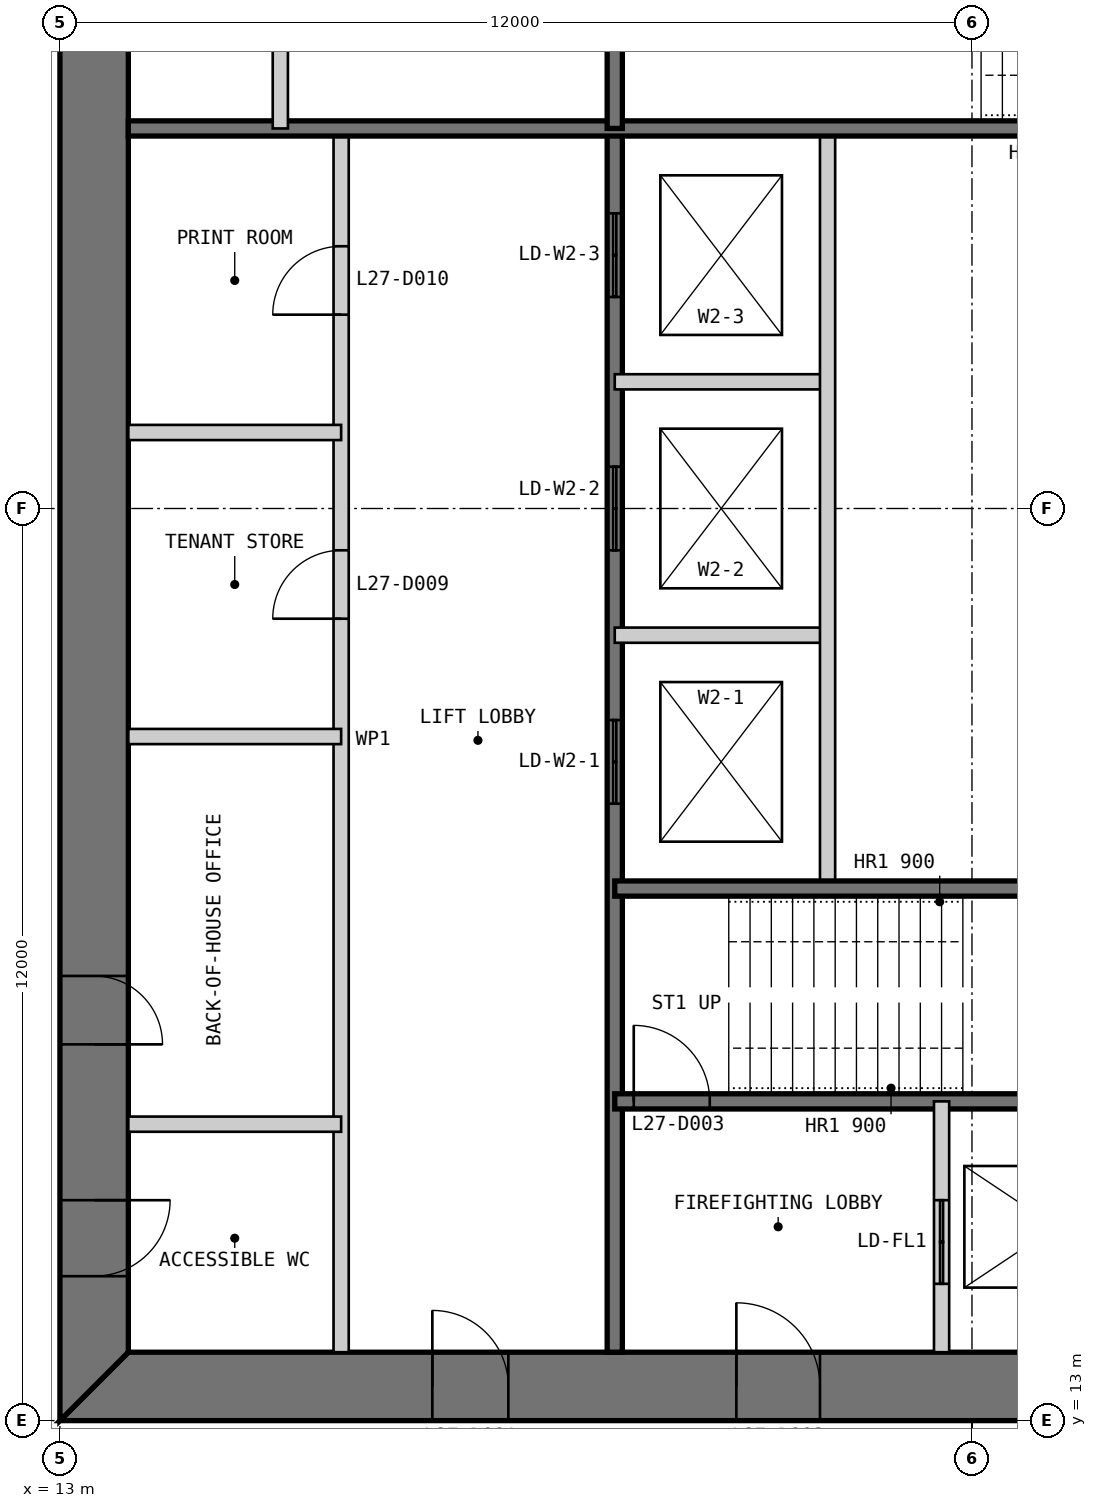
"""IFC4 building model, lengths in metres.
Left out: names, types, materials, properties, quantities, classifications, styles, units other than length and angle.
Written with IfcOpenShell. Run it as: python <this file> out.ifc"""

import sys

from ifc_helpers import new_model, si_unit, direction, frame, frame_2d, origin, place, context, subcontext, project, spatial, polyline, rectangle, outline, extrude, element, fill, save


model = new_model("IFC4")
c1 = context("Model", 3, precision=1e-05, world=origin(), true_north=direction((0.0, 1.0)))
c2 = subcontext(c1, "Body", "Model", "MODEL_VIEW")
j1 = project(units=[si_unit("LENGTHUNIT", "METRE"), si_unit("PLANEANGLEUNIT", "RADIAN")], contexts=[c1])
p1 = place(None, origin())
s1 = spatial("IfcSite", under=j1, at=p1, CompositionType="ELEMENT")
p2 = place(p1, origin())
s2 = spatial("IfcBuilding", under=s1, at=p2, CompositionType="ELEMENT")
p3 = place(p2, frame((0.0, 0.0, 118.4)))
s3 = spatial("IfcBuildingStorey", under=s2, at=p3, CompositionType="ELEMENT", Elevation=118.4)
p4 = place(p3, frame((13.0, 13.45, 0.0), z_axis=(0.0, 0.0, 1.0), x_axis=(1.0, 0.0, 0.0)))
e1 = element("IfcWall", 1, at=p4, inside=s3, PredefinedType="SHEAR", context=c2, shape_type="SweptSolid", body=[
    extrude(outline(polyline([(0.0, -0.45), (24.0, -0.45), (23.1, 0.45), (0.9, 0.45), (0.0, -0.45)])), origin(), (0.0, 0.0, 1.0), 4.0),
])
p5 = place(p4, frame((4.9, 0.0, 0.0)))
e2 = element("IfcOpeningElement", 2, at=p5, cuts=e1, PredefinedType="OPENING", context=c2, shape_type="SweptSolid", body=[
    extrude(rectangle(XDim=1.0, YDim=2.2, at=frame_2d((0.5, 1.1))), frame((0.0, 0.46, 0.0), z_axis=(0.0, -1.0, 0.0), x_axis=(1.0, 0.0, 0.0)), (0.0, 0.0, 1.0), 0.92),
])
p6 = place(p4, frame((8.9, 0.0, 0.0)))
e3 = element("IfcOpeningElement", 3, at=p6, cuts=e1, PredefinedType="OPENING", context=c2, shape_type="SweptSolid", body=[
    extrude(rectangle(XDim=1.1, YDim=2.2, at=frame_2d((0.55, 1.1))), frame((0.0, 0.46, 0.0), z_axis=(0.0, -1.0, 0.0), x_axis=(1.0, 0.0, 0.0)), (0.0, 0.0, 1.0), 0.92),
])
p7 = place(p4, frame((15.05, 0.0, 0.0)))
e4 = element("IfcOpeningElement", 4, at=p7, cuts=e1, PredefinedType="OPENING", context=c2, shape_type="SweptSolid", body=[
    extrude(rectangle(XDim=0.9, YDim=2.2, at=frame_2d((0.45, 1.1))), frame((0.0, 0.46, 0.0), z_axis=(0.0, -1.0, 0.0), x_axis=(1.0, 0.0, 0.0)), (0.0, 0.0, 1.0), 0.92),
])
p8 = place(p4, frame((17.9, 0.0, 0.0)))
e5 = element("IfcOpeningElement", 5, at=p8, cuts=e1, PredefinedType="OPENING", context=c2, shape_type="SweptSolid", body=[
    extrude(rectangle(XDim=1.0, YDim=2.2, at=frame_2d((0.5, 1.1))), frame((0.0, 0.46, 0.0), z_axis=(0.0, -1.0, 0.0), x_axis=(1.0, 0.0, 0.0)), (0.0, 0.0, 1.0), 0.92),
])
p9 = place(p4, frame((21.4, 0.0, 0.0)))
e6 = element("IfcOpeningElement", 6, at=p9, cuts=e1, PredefinedType="OPENING", context=c2, shape_type="SweptSolid", body=[
    extrude(rectangle(XDim=1.0, YDim=2.2, at=frame_2d((0.5, 1.1))), frame((0.0, 0.46, 0.0), z_axis=(0.0, -1.0, 0.0), x_axis=(1.0, 0.0, 0.0)), (0.0, 0.0, 1.0), 0.92),
])
p10 = place(p3, frame((13.45, 36.1, 0.0), z_axis=(0.0, 0.0, 1.0), x_axis=(0.0, -1.0, 0.0)))
e7 = element("IfcWall", 7, at=p10, inside=s3, PredefinedType="SHEAR", context=c2, shape_type="SweptSolid", body=[
    extrude(outline(polyline([(-0.9, -0.45), (23.1, -0.45), (22.2, 0.45), (0.0, 0.45), (-0.9, -0.45)])), origin(), (0.0, 0.0, 1.0), 4.0),
])
p11 = place(p10, frame((20.2, 0.0, 0.0)))
e8 = element("IfcOpeningElement", 8, at=p11, cuts=e7, PredefinedType="OPENING", context=c2, shape_type="SweptSolid", body=[
    extrude(rectangle(XDim=1.0, YDim=2.2, at=frame_2d((0.5, 1.1))), frame((0.0, 0.46, 0.0), z_axis=(0.0, -1.0, 0.0), x_axis=(1.0, 0.0, 0.0)), (0.0, 0.0, 1.0), 0.92),
])
p12 = place(p10, frame((17.25, 0.0, 0.0)))
e9 = element("IfcOpeningElement", 9, at=p12, cuts=e7, PredefinedType="OPENING", context=c2, shape_type="SweptSolid", body=[
    extrude(rectangle(XDim=0.9, YDim=2.2, at=frame_2d((0.45, 1.1))), frame((0.0, 0.46, 0.0), z_axis=(0.0, -1.0, 0.0), x_axis=(1.0, 0.0, 0.0)), (0.0, 0.0, 1.0), 0.92),
])
p13 = place(p3, frame((16.7, 13.9, 0.0), z_axis=(0.0, 0.0, 1.0), x_axis=(0.0, 1.0, 0.0)))
e10 = element("IfcWall", 10, at=p13, inside=s3, PredefinedType="PARTITIONING", context=c2, shape_type="SweptSolid", body=[
    extrude(rectangle(XDim=16.1, YDim=0.2, at=frame_2d((8.05, 0.0))), origin(), (0.0, 0.0, 1.0), 3.8),
])
p14 = place(p13, frame((9.65, 0.0, 0.0)))
e11 = element("IfcOpeningElement", 11, at=p14, cuts=e10, PredefinedType="OPENING", context=c2, shape_type="SweptSolid", body=[
    extrude(rectangle(XDim=0.9, YDim=2.2, at=frame_2d((0.45, 1.1))), frame((0.0, 0.11, 0.0), z_axis=(0.0, -1.0, 0.0), x_axis=(1.0, 0.0, 0.0)), (0.0, 0.0, 1.0), 0.22),
])
p15 = place(p13, frame((13.65, 0.0, 0.0)))
e12 = element("IfcOpeningElement", 12, at=p15, cuts=e10, PredefinedType="OPENING", context=c2, shape_type="SweptSolid", body=[
    extrude(rectangle(XDim=0.9, YDim=2.2, at=frame_2d((0.45, 1.1))), frame((0.0, 0.11, 0.0), z_axis=(0.0, -1.0, 0.0), x_axis=(1.0, 0.0, 0.0)), (0.0, 0.0, 1.0), 0.22),
])
p16 = place(p3, frame((20.3, 13.9, 0.0), z_axis=(0.0, 0.0, 1.0), x_axis=(0.0, 1.0, 0.0)))
e13 = element("IfcWall", 13, at=p16, inside=s3, PredefinedType="SOLIDWALL", context=c2, shape_type="SweptSolid", body=[
    extrude(rectangle(XDim=16.1, YDim=0.2, at=frame_2d((8.05, 0.0))), origin(), (0.0, 0.0, 1.0), 3.8),
])
p17 = place(p16, frame((7.217, 0.0, 0.0)))
e14 = element("IfcOpeningElement", 14, at=p17, cuts=e13, PredefinedType="OPENING", context=c2, shape_type="SweptSolid", body=[
    extrude(rectangle(XDim=1.1, YDim=2.2, at=frame_2d((0.55, 1.1))), frame((0.0, 0.11, 0.0), z_axis=(0.0, -1.0, 0.0), x_axis=(1.0, 0.0, 0.0)), (0.0, 0.0, 1.0), 0.22),
])
p18 = place(p16, frame((10.55, 0.0, 0.0)))
e15 = element("IfcOpeningElement", 15, at=p18, cuts=e13, PredefinedType="OPENING", context=c2, shape_type="SweptSolid", body=[
    extrude(rectangle(XDim=1.1, YDim=2.2, at=frame_2d((0.55, 1.1))), frame((0.0, 0.11, 0.0), z_axis=(0.0, -1.0, 0.0), x_axis=(1.0, 0.0, 0.0)), (0.0, 0.0, 1.0), 0.22),
])
p19 = place(p16, frame((13.883, 0.0, 0.0)))
e16 = element("IfcOpeningElement", 16, at=p19, cuts=e13, PredefinedType="OPENING", context=c2, shape_type="SweptSolid", body=[
    extrude(rectangle(XDim=1.1, YDim=2.2, at=frame_2d((0.55, 1.1))), frame((0.0, 0.11, 0.0), z_axis=(0.0, -1.0, 0.0), x_axis=(1.0, 0.0, 0.0)), (0.0, 0.0, 1.0), 0.22),
])
for number, where, z_axis, x_axis in (
    (17, (20.3, 23.333, 0.0), (0.0, 0.0, 1.0), (1.0, 0.0, 0.0)),
    (18, (20.3, 26.667, 0.0), (0.0, 0.0, 1.0), (1.0, 0.0, 0.0)),
):
    element("IfcWall", number, at=place(p3, frame(where, z_axis=z_axis, x_axis=x_axis)), inside=s3, PredefinedType="PARTITIONING", context=c2, shape_type="SweptSolid", body=[
        extrude(rectangle(XDim=2.8, YDim=0.2, at=frame_2d((1.4, 0.0))), origin(), (0.0, 0.0, 1.0), 3.8),
    ])
p20 = place(p3, frame((23.1, 20.0, 0.0), z_axis=(0.0, 0.0, 1.0), x_axis=(0.0, 1.0, 0.0)))
e19 = element("IfcWall", 19, at=p20, inside=s3, PredefinedType="PARTITIONING", context=c2, shape_type="SweptSolid", body=[
    extrude(rectangle(XDim=10.0, YDim=0.2, at=frame_2d((5.0, 0.0))), origin(), (0.0, 0.0, 1.0), 3.8),
])
p21 = place(p3, frame((20.3, 17.2, 0.0), z_axis=(0.0, 0.0, 1.0), x_axis=(1.0, 0.0, 0.0)))
e20 = element("IfcWall", 20, at=p21, inside=s3, PredefinedType="SOLIDWALL", context=c2, shape_type="SweptSolid", body=[
    extrude(rectangle(XDim=9.4, YDim=0.2, at=frame_2d((4.7, 0.0))), origin(), (0.0, 0.0, 1.0), 3.8),
])
p22 = place(p21, frame((0.25, 0.0, 0.0)))
e21 = element("IfcOpeningElement", 21, at=p22, cuts=e20, PredefinedType="OPENING", context=c2, shape_type="SweptSolid", body=[
    extrude(rectangle(XDim=1.0, YDim=2.2, at=frame_2d((0.5, 1.1))), frame((0.0, 0.11, 0.0), z_axis=(0.0, -1.0, 0.0), x_axis=(1.0, 0.0, 0.0)), (0.0, 0.0, 1.0), 0.22),
])
p23 = place(p3, frame((20.3, 20.0, 0.0), z_axis=(0.0, 0.0, 1.0), x_axis=(1.0, 0.0, 0.0)))
e22 = element("IfcWall", 22, at=p23, inside=s3, PredefinedType="SOLIDWALL", context=c2, shape_type="SweptSolid", body=[
    extrude(rectangle(XDim=15.8, YDim=0.2, at=frame_2d((7.9, 0.0))), origin(), (0.0, 0.0, 1.0), 3.8),
])
p24 = place(p3, frame((24.6, 13.9, 0.0), z_axis=(0.0, 0.0, 1.0), x_axis=(0.0, 1.0, 0.0)))
e23 = element("IfcWall", 23, at=p24, inside=s3, PredefinedType="PARTITIONING", context=c2, shape_type="SweptSolid", body=[
    extrude(rectangle(XDim=3.3, YDim=0.2, at=frame_2d((1.65, 0.0))), origin(), (0.0, 0.0, 1.0), 3.8),
])
p25 = place(p24, frame((0.9, 0.0, 0.0)))
e24 = element("IfcOpeningElement", 24, at=p25, cuts=e23, PredefinedType="OPENING", context=c2, shape_type="SweptSolid", body=[
    extrude(rectangle(XDim=1.1, YDim=2.2, at=frame_2d((0.55, 1.1))), frame((0.0, 0.11, 0.0), z_axis=(0.0, -1.0, 0.0), x_axis=(1.0, 0.0, 0.0)), (0.0, 0.0, 1.0), 0.22),
])
for number, where, z_axis, x_axis in (
    (25, (13.9, 16.9, 0.0), (0.0, 0.0, 1.0), (1.0, 0.0, 0.0)),
    (26, (13.9, 22.0, 0.0), (0.0, 0.0, 1.0), (1.0, 0.0, 0.0)),
    (27, (13.9, 26.0, 0.0), (0.0, 0.0, 1.0), (1.0, 0.0, 0.0)),
):
    element("IfcWall", number, at=place(p3, frame(where, z_axis=z_axis, x_axis=x_axis)), inside=s3, PredefinedType="PARTITIONING", context=c2, shape_type="SweptSolid", body=[
        extrude(rectangle(XDim=2.8, YDim=0.2, at=frame_2d((1.4, 0.0))), origin(), (0.0, 0.0, 1.0), 3.8),
    ])
p26 = place(p3, frame((29.7, 30.0, 0.0), z_axis=(0.0, 0.0, 1.0), x_axis=(-1.0, 0.0, 0.0)))
e28 = element("IfcWall", 28, at=p26, inside=s3, PredefinedType="SOLIDWALL", context=c2, shape_type="SweptSolid", body=[
    extrude(rectangle(XDim=15.8, YDim=0.2, at=frame_2d((7.9, 0.0))), origin(), (0.0, 0.0, 1.0), 3.8),
])
p27 = place(p3, frame((20.3, 36.1, 0.0), z_axis=(0.0, 0.0, 1.0), x_axis=(0.0, -1.0, 0.0)))
e29 = element("IfcWall", 29, at=p27, inside=s3, PredefinedType="SOLIDWALL", context=c2, shape_type="SweptSolid", body=[
    extrude(rectangle(XDim=6.1, YDim=0.2, at=frame_2d((3.05, 0.0))), origin(), (0.0, 0.0, 1.0), 3.8),
])
p28 = place(p3, frame((15.9, 36.1, 0.0), z_axis=(0.0, 0.0, 1.0), x_axis=(0.0, -1.0, 0.0)))
e30 = element("IfcWall", 30, at=p28, inside=s3, PredefinedType="PARTITIONING", context=c2, shape_type="SweptSolid", body=[
    extrude(rectangle(XDim=6.1, YDim=0.2, at=frame_2d((3.05, 0.0))), origin(), (0.0, 0.0, 1.0), 3.8),
])
p29 = place(p5, origin())
e31 = element("IfcDoor", 31, at=p29, inside=s3, OperationType="SINGLE_SWING_LEFT", PredefinedType="DOOR", context=c2, shape_type="SweptSolid", body=[
    extrude(rectangle(XDim=1.0, YDim=2.2, at=frame_2d((0.5, 1.1))), frame((0.0, 0.025, 0.0), z_axis=(0.0, -1.0, 0.0), x_axis=(1.0, 0.0, 0.0)), (0.0, 0.0, 1.0), 0.05),
    extrude(outline(polyline([(0.0, 0.0), (0.04, 0.0), (0.04, 2.16), (0.96, 2.16), (0.96, 0.0), (1.0, 0.0), (1.0, 2.2), (0.0, 2.2), (0.0, 0.0)])), frame((0.0, 0.3, 0.0), z_axis=(0.0, -1.0, 0.0), x_axis=(1.0, 0.0, 0.0)), (0.0, 0.0, 1.0), 0.6),
])
fill(e2, e31)
p30 = place(p6, origin())
e32 = element("IfcDoor", 32, at=p30, inside=s3, OperationType="SINGLE_SWING_LEFT", PredefinedType="DOOR", context=c2, shape_type="SweptSolid", body=[
    extrude(rectangle(XDim=1.1, YDim=2.2, at=frame_2d((0.55, 1.1))), frame((0.0, 0.025, 0.0), z_axis=(0.0, -1.0, 0.0), x_axis=(1.0, 0.0, 0.0)), (0.0, 0.0, 1.0), 0.05),
    extrude(outline(polyline([(0.0, 0.0), (0.04, 0.0), (0.04, 2.16), (1.06, 2.16), (1.06, 0.0), (1.1, 0.0), (1.1, 2.2), (0.0, 2.2), (0.0, 0.0)])), frame((0.0, 0.3, 0.0), z_axis=(0.0, -1.0, 0.0), x_axis=(1.0, 0.0, 0.0)), (0.0, 0.0, 1.0), 0.6),
])
fill(e3, e32)
p31 = place(p22, origin())
e33 = element("IfcDoor", 33, at=p31, inside=s3, OperationType="SINGLE_SWING_LEFT", PredefinedType="DOOR", context=c2, shape_type="SweptSolid", body=[
    extrude(rectangle(XDim=1.0, YDim=2.2, at=frame_2d((0.5, 1.1))), frame((0.0, 0.025, 0.0), z_axis=(0.0, -1.0, 0.0), x_axis=(1.0, 0.0, 0.0)), (0.0, 0.0, 1.0), 0.05),
])
fill(e21, e33)
p32 = place(p11, origin())
e34 = element("IfcDoor", 34, at=p32, inside=s3, OperationType="SINGLE_SWING_LEFT", PredefinedType="DOOR", context=c2, shape_type="SweptSolid", body=[
    extrude(rectangle(XDim=1.0, YDim=2.2, at=frame_2d((0.5, 1.1))), frame((0.0, 0.025, 0.0), z_axis=(0.0, -1.0, 0.0), x_axis=(1.0, 0.0, 0.0)), (0.0, 0.0, 1.0), 0.05),
    extrude(outline(polyline([(0.0, 0.0), (0.04, 0.0), (0.04, 2.16), (0.96, 2.16), (0.96, 0.0), (1.0, 0.0), (1.0, 2.2), (0.0, 2.2), (0.0, 0.0)])), frame((0.0, 0.3, 0.0), z_axis=(0.0, -1.0, 0.0), x_axis=(1.0, 0.0, 0.0)), (0.0, 0.0, 1.0), 0.6),
])
fill(e8, e34)
p33 = place(p12, origin())
e35 = element("IfcDoor", 35, at=p33, inside=s3, OperationType="SINGLE_SWING_RIGHT", PredefinedType="DOOR", context=c2, shape_type="SweptSolid", body=[
    extrude(rectangle(XDim=0.9, YDim=2.2, at=frame_2d((0.45, 1.1))), frame((0.0, 0.025, 0.0), z_axis=(0.0, -1.0, 0.0), x_axis=(1.0, 0.0, 0.0)), (0.0, 0.0, 1.0), 0.05),
    extrude(outline(polyline([(0.0, 0.0), (0.04, 0.0), (0.04, 2.16), (0.86, 2.16), (0.86, 0.0), (0.9, 0.0), (0.9, 2.2), (0.0, 2.2), (0.0, 0.0)])), frame((0.0, 0.3, 0.0), z_axis=(0.0, -1.0, 0.0), x_axis=(1.0, 0.0, 0.0)), (0.0, 0.0, 1.0), 0.6),
])
fill(e9, e35)
p34 = place(p14, origin())
e36 = element("IfcDoor", 36, at=p34, inside=s3, OperationType="SINGLE_SWING_LEFT", PredefinedType="DOOR", context=c2, shape_type="SweptSolid", body=[
    extrude(rectangle(XDim=0.9, YDim=2.2, at=frame_2d((0.45, 1.1))), frame((0.0, 0.025, 0.0), z_axis=(0.0, -1.0, 0.0), x_axis=(1.0, 0.0, 0.0)), (0.0, 0.0, 1.0), 0.05),
])
fill(e11, e36)
p35 = place(p15, origin())
e37 = element("IfcDoor", 37, at=p35, inside=s3, OperationType="SINGLE_SWING_LEFT", PredefinedType="DOOR", context=c2, shape_type="SweptSolid", body=[
    extrude(rectangle(XDim=0.9, YDim=2.2, at=frame_2d((0.45, 1.1))), frame((0.0, 0.025, 0.0), z_axis=(0.0, -1.0, 0.0), x_axis=(1.0, 0.0, 0.0)), (0.0, 0.0, 1.0), 0.05),
])
fill(e12, e37)
p36 = place(p25, origin())
e38 = element("IfcDoor", 38, at=p36, inside=s3, OperationType="DOUBLE_DOOR_SLIDING", PredefinedType="DOOR", context=c2, shape_type="SweptSolid", body=[
    extrude(rectangle(XDim=1.1, YDim=2.2, at=frame_2d((0.55, 1.1))), frame((0.0, 0.025, 0.0), z_axis=(0.0, -1.0, 0.0), x_axis=(1.0, 0.0, 0.0)), (0.0, 0.0, 1.0), 0.05),
])
fill(e24, e38)
p37 = place(p17, origin())
e39 = element("IfcDoor", 39, at=p37, inside=s3, OperationType="DOUBLE_DOOR_SLIDING", PredefinedType="DOOR", context=c2, shape_type="SweptSolid", body=[
    extrude(rectangle(XDim=1.1, YDim=2.2, at=frame_2d((0.55, 1.1))), frame((0.0, 0.025, 0.0), z_axis=(0.0, -1.0, 0.0), x_axis=(1.0, 0.0, 0.0)), (0.0, 0.0, 1.0), 0.05),
])
fill(e14, e39)
p38 = place(p18, origin())
e40 = element("IfcDoor", 40, at=p38, inside=s3, OperationType="DOUBLE_DOOR_SLIDING", PredefinedType="DOOR", context=c2, shape_type="SweptSolid", body=[
    extrude(rectangle(XDim=1.1, YDim=2.2, at=frame_2d((0.55, 1.1))), frame((0.0, 0.025, 0.0), z_axis=(0.0, -1.0, 0.0), x_axis=(1.0, 0.0, 0.0)), (0.0, 0.0, 1.0), 0.05),
])
fill(e15, e40)
p39 = place(p19, origin())
e41 = element("IfcDoor", 41, at=p39, inside=s3, OperationType="DOUBLE_DOOR_SLIDING", PredefinedType="DOOR", context=c2, shape_type="SweptSolid", body=[
    extrude(rectangle(XDim=1.1, YDim=2.2, at=frame_2d((0.55, 1.1))), frame((0.0, 0.025, 0.0), z_axis=(0.0, -1.0, 0.0), x_axis=(1.0, 0.0, 0.0)), (0.0, 0.0, 1.0), 0.05),
])
fill(e16, e41)
save(model, sys.argv[1])
